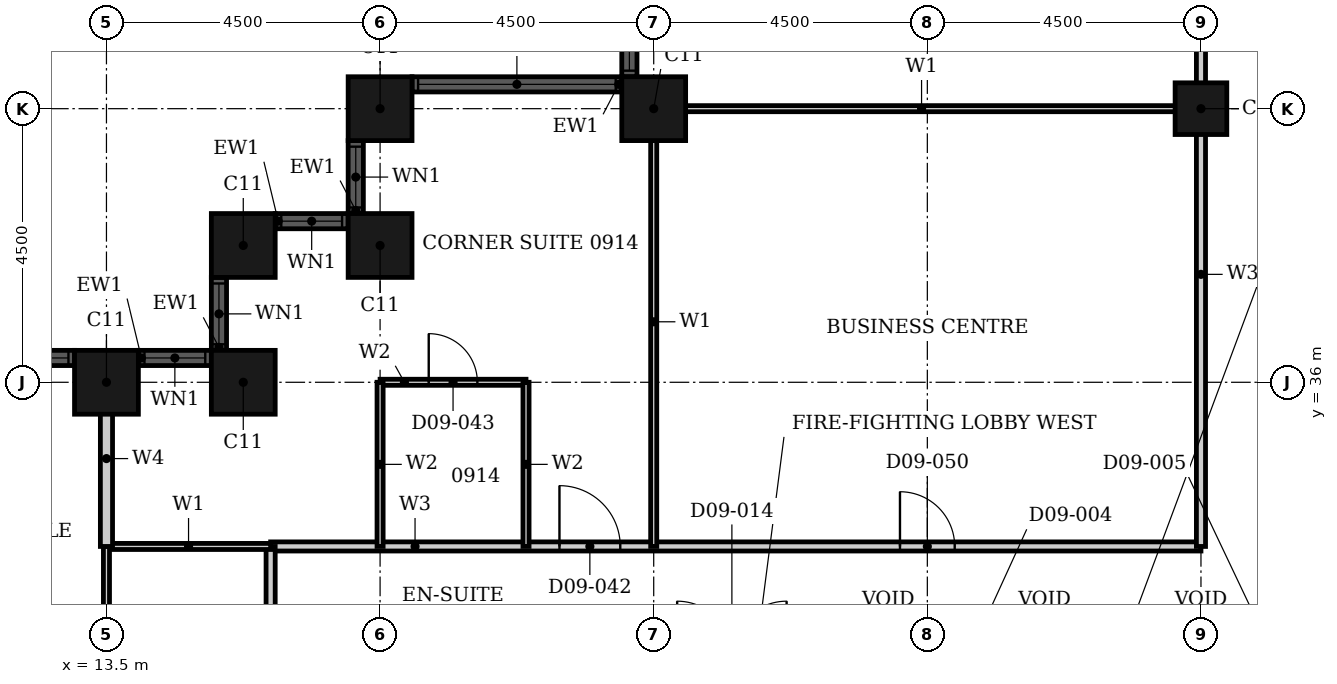
"""IFC4 building model, lengths in metres.
Left out: names, types, materials, properties, quantities, classifications, styles, units other than length and angle.
Written with IfcOpenShell. Run it as: python <this file> out.ifc"""

import sys

from ifc_helpers import new_model, si_unit, direction, frame, frame_2d, origin, origin_2d, place, context, subcontext, project, spatial, rectangle, hollow_rectangle, extrude, element, fill, save


model = new_model("IFC4")
c1 = context("Model", 3, precision=1e-05, world=origin(), true_north=direction((0.0, 1.0)))
c2 = subcontext(c1, "Body", "Model", "MODEL_VIEW")
j1 = project(units=[si_unit("LENGTHUNIT", "METRE"), si_unit("PLANEANGLEUNIT", "RADIAN")], contexts=[c1])
p1 = place(None, origin())
s1 = spatial("IfcSite", under=j1, at=p1, CompositionType="ELEMENT")
p2 = place(p1, origin())
s2 = spatial("IfcBuilding", under=s1, at=p2, CompositionType="ELEMENT")
p3 = place(p2, frame((0.0, 0.0, 44.4)))
s3 = spatial("IfcBuildingStorey", under=s2, at=p3, CompositionType="ELEMENT", Elevation=44.4)
for number, where, z_axis, x_axis in (
    (1, (22.5, 40.5, 0.0), (0.0, 0.0, 1.0), (1.0, 0.0, 0.0)),
    (2, (18.0, 40.5, 0.0), (0.0, 0.0, 1.0), (1.0, 0.0, 0.0)),
    (3, (18.0, 38.25, 0.0), (0.0, 0.0, 1.0), (1.0, 0.0, 0.0)),
    (4, (15.75, 38.25, 0.0), (0.0, 0.0, 1.0), (1.0, 0.0, 0.0)),
    (5, (15.75, 36.0, 0.0), (0.0, 0.0, 1.0), (1.0, 0.0, 0.0)),
    (6, (13.5, 36.0, 0.0), (0.0, 0.0, 1.0), (1.0, 0.0, 0.0)),
):
    element("IfcColumn", number, at=place(p3, frame(where, z_axis=z_axis, x_axis=x_axis)), inside=s3, PredefinedType="COLUMN", context=c2, shape_type="SweptSolid", body=[
        extrude(hollow_rectangle(XDim=1.05, YDim=1.05, WallThickness=0.034, at=origin_2d()), origin(), (0.0, 0.0, 1.0), 3.6),
    ])
p4 = place(p3, frame((31.5, 40.5, 0.0), z_axis=(0.0, 0.0, 1.0), x_axis=(1.0, 0.0, 0.0)))
e7 = element("IfcColumn", 7, at=p4, inside=s3, PredefinedType="COLUMN", context=c2, shape_type="SweptSolid", body=[
    extrude(hollow_rectangle(XDim=0.85, YDim=0.85, WallThickness=0.026, at=origin_2d()), origin(), (0.0, 0.0, 1.0), 3.6),
])
p5 = place(p3, frame((22.1, 48.975, 0.0), z_axis=(0.0, 0.0, 1.0), x_axis=(0.0, -1.0, 0.0)))
e8 = element("IfcWall", 8, at=p5, inside=s3, PredefinedType="SOLIDWALL", context=c2, shape_type="SweptSolid", body=[
    extrude(rectangle(XDim=7.95, YDim=0.25, at=frame_2d((3.975, 0.0))), origin(), (0.0, 0.0, 1.0), 3.6),
])
p6 = place(p5, frame((0.1, 0.0, 0.9)))
e9 = element("IfcOpeningElement", 9, at=p6, cuts=e8, PredefinedType="OPENING", context=c2, shape_type="SweptSolid", body=[
    extrude(rectangle(XDim=3.25, YDim=2.08, at=frame_2d((1.625, 1.04))), frame((0.0, 0.135, 0.0), z_axis=(0.0, -1.0, 0.0), x_axis=(1.0, 0.0, 0.0)), (0.0, 0.0, 1.0), 0.27),
])
p7 = place(p5, frame((4.6, 0.0, 0.9)))
e10 = element("IfcOpeningElement", 10, at=p7, cuts=e8, PredefinedType="OPENING", context=c2, shape_type="SweptSolid", body=[
    extrude(rectangle(XDim=3.25, YDim=2.08, at=frame_2d((1.625, 1.04))), frame((0.0, 0.135, 0.0), z_axis=(0.0, -1.0, 0.0), x_axis=(1.0, 0.0, 0.0)), (0.0, 0.0, 1.0), 0.27),
])
p8 = place(p3, frame((21.975, 40.9, 0.0), z_axis=(0.0, 0.0, 1.0), x_axis=(-1.0, 0.0, 0.0)))
e11 = element("IfcWall", 11, at=p8, inside=s3, PredefinedType="SOLIDWALL", context=c2, shape_type="SweptSolid", body=[
    extrude(rectangle(XDim=3.45, YDim=0.25, at=frame_2d((1.725, 0.0))), origin(), (0.0, 0.0, 1.0), 3.6),
])
p9 = place(p8, frame((0.1, 0.0, 0.9)))
e12 = element("IfcOpeningElement", 12, at=p9, cuts=e11, PredefinedType="OPENING", context=c2, shape_type="SweptSolid", body=[
    extrude(rectangle(XDim=3.25, YDim=2.08, at=frame_2d((1.625, 1.04))), frame((0.0, 0.135, 0.0), z_axis=(0.0, -1.0, 0.0), x_axis=(1.0, 0.0, 0.0)), (0.0, 0.0, 1.0), 0.27),
])
p10 = place(p3, frame((17.6, 39.975, 0.0), z_axis=(0.0, 0.0, 1.0), x_axis=(0.0, -1.0, 0.0)))
e13 = element("IfcWall", 13, at=p10, inside=s3, PredefinedType="SOLIDWALL", context=c2, shape_type="SweptSolid", body=[
    extrude(rectangle(XDim=1.2, YDim=0.25, at=frame_2d((0.6, 0.0))), origin(), (0.0, 0.0, 1.0), 3.6),
])
p11 = place(p10, frame((0.1, 0.0, 0.9)))
e14 = element("IfcOpeningElement", 14, at=p11, cuts=e13, PredefinedType="OPENING", context=c2, shape_type="SweptSolid", body=[
    extrude(rectangle(XDim=1.0, YDim=2.08, at=frame_2d((0.5, 1.04))), frame((0.0, 0.135, 0.0), z_axis=(0.0, -1.0, 0.0), x_axis=(1.0, 0.0, 0.0)), (0.0, 0.0, 1.0), 0.27),
])
p12 = place(p3, frame((17.475, 38.65, 0.0), z_axis=(0.0, 0.0, 1.0), x_axis=(-1.0, 0.0, 0.0)))
e15 = element("IfcWall", 15, at=p12, inside=s3, PredefinedType="SOLIDWALL", context=c2, shape_type="SweptSolid", body=[
    extrude(rectangle(XDim=1.2, YDim=0.25, at=frame_2d((0.6, 0.0))), origin(), (0.0, 0.0, 1.0), 3.6),
])
p13 = place(p12, frame((0.1, 0.0, 0.9)))
e16 = element("IfcOpeningElement", 16, at=p13, cuts=e15, PredefinedType="OPENING", context=c2, shape_type="SweptSolid", body=[
    extrude(rectangle(XDim=1.0, YDim=2.08, at=frame_2d((0.5, 1.04))), frame((0.0, 0.135, 0.0), z_axis=(0.0, -1.0, 0.0), x_axis=(1.0, 0.0, 0.0)), (0.0, 0.0, 1.0), 0.27),
])
p14 = place(p3, frame((15.35, 37.725, 0.0), z_axis=(0.0, 0.0, 1.0), x_axis=(0.0, -1.0, 0.0)))
e17 = element("IfcWall", 17, at=p14, inside=s3, PredefinedType="SOLIDWALL", context=c2, shape_type="SweptSolid", body=[
    extrude(rectangle(XDim=1.2, YDim=0.25, at=frame_2d((0.6, 0.0))), origin(), (0.0, 0.0, 1.0), 3.6),
])
p15 = place(p14, frame((0.1, 0.0, 0.9)))
e18 = element("IfcOpeningElement", 18, at=p15, cuts=e17, PredefinedType="OPENING", context=c2, shape_type="SweptSolid", body=[
    extrude(rectangle(XDim=1.0, YDim=2.08, at=frame_2d((0.5, 1.04))), frame((0.0, 0.135, 0.0), z_axis=(0.0, -1.0, 0.0), x_axis=(1.0, 0.0, 0.0)), (0.0, 0.0, 1.0), 0.27),
])
p16 = place(p3, frame((15.225, 36.4, 0.0), z_axis=(0.0, 0.0, 1.0), x_axis=(-1.0, 0.0, 0.0)))
e19 = element("IfcWall", 19, at=p16, inside=s3, PredefinedType="SOLIDWALL", context=c2, shape_type="SweptSolid", body=[
    extrude(rectangle(XDim=1.2, YDim=0.25, at=frame_2d((0.6, 0.0))), origin(), (0.0, 0.0, 1.0), 3.6),
])
p17 = place(p16, frame((0.1, 0.0, 0.9)))
e20 = element("IfcOpeningElement", 20, at=p17, cuts=e19, PredefinedType="OPENING", context=c2, shape_type="SweptSolid", body=[
    extrude(rectangle(XDim=1.0, YDim=2.08, at=frame_2d((0.5, 1.04))), frame((0.0, 0.135, 0.0), z_axis=(0.0, -1.0, 0.0), x_axis=(1.0, 0.0, 0.0)), (0.0, 0.0, 1.0), 0.27),
])
p18 = place(p3, frame((12.975, 36.4, 0.0), z_axis=(0.0, 0.0, 1.0), x_axis=(-1.0, 0.0, 0.0)))
e21 = element("IfcWall", 21, at=p18, inside=s3, PredefinedType="SOLIDWALL", context=c2, shape_type="SweptSolid", body=[
    extrude(rectangle(XDim=7.95, YDim=0.25, at=frame_2d((3.975, 0.0))), origin(), (0.0, 0.0, 1.0), 3.6),
])
p19 = place(p18, frame((0.1, 0.0, 0.9)))
e22 = element("IfcOpeningElement", 22, at=p19, cuts=e21, PredefinedType="OPENING", context=c2, shape_type="SweptSolid", body=[
    extrude(rectangle(XDim=3.25, YDim=2.08, at=frame_2d((1.625, 1.04))), frame((0.0, 0.135, 0.0), z_axis=(0.0, -1.0, 0.0), x_axis=(1.0, 0.0, 0.0)), (0.0, 0.0, 1.0), 0.27),
])
p20 = place(p18, frame((4.6, 0.0, 0.9)))
e23 = element("IfcOpeningElement", 23, at=p20, cuts=e21, PredefinedType="OPENING", context=c2, shape_type="SweptSolid", body=[
    extrude(rectangle(XDim=3.25, YDim=2.08, at=frame_2d((1.625, 1.04))), frame((0.0, 0.135, 0.0), z_axis=(0.0, -1.0, 0.0), x_axis=(1.0, 0.0, 0.0)), (0.0, 0.0, 1.0), 0.27),
])
p21 = place(p3, frame((16.2, 33.3, 0.0), z_axis=(0.0, 0.0, 1.0), x_axis=(1.0, 0.0, 0.0)))
e24 = element("IfcWall", 24, at=p21, inside=s3, PredefinedType="PARTITIONING", context=c2, shape_type="SweptSolid", body=[
    extrude(rectangle(XDim=15.3, YDim=0.15, at=frame_2d((7.65, 0.0))), origin(), (0.0, 0.0, 1.0), 3.2),
])
p22 = place(p21, frame((4.75, 0.0, 0.0)))
e25 = element("IfcOpeningElement", 25, at=p22, cuts=e24, PredefinedType="OPENING", context=c2, shape_type="SweptSolid", body=[
    extrude(rectangle(XDim=1.0, YDim=2.1, at=frame_2d((0.5, 1.05))), frame((0.0, 0.085, 0.0), z_axis=(0.0, -1.0, 0.0), x_axis=(1.0, 0.0, 0.0)), (0.0, 0.0, 1.0), 0.17),
])
p23 = place(p21, frame((10.35, 0.0, 0.0)))
e26 = element("IfcOpeningElement", 26, at=p23, cuts=e24, PredefinedType="OPENING", context=c2, shape_type="SweptSolid", body=[
    extrude(rectangle(XDim=0.9, YDim=2.1, at=frame_2d((0.45, 1.05))), frame((0.0, 0.085, 0.0), z_axis=(0.0, -1.0, 0.0), x_axis=(1.0, 0.0, 0.0)), (0.0, 0.0, 1.0), 0.17),
])
p24 = place(p3, frame((16.2, 27.0, 0.0), z_axis=(0.0, 0.0, 1.0), x_axis=(0.0, 1.0, 0.0)))
e27 = element("IfcWall", 27, at=p24, inside=s3, PredefinedType="PARTITIONING", context=c2, shape_type="SweptSolid", body=[
    extrude(rectangle(XDim=6.3, YDim=0.15, at=frame_2d((3.15, 0.0))), origin(), (0.0, 0.0, 1.0), 3.2),
])
p25 = place(p24, frame((2.525, 0.0, 0.0)))
e28 = element("IfcOpeningElement", 28, at=p25, cuts=e27, PredefinedType="OPENING", context=c2, shape_type="SweptSolid", body=[
    extrude(rectangle(XDim=0.95, YDim=2.1, at=frame_2d((0.475, 1.05))), frame((0.0, 0.085, 0.0), z_axis=(0.0, -1.0, 0.0), x_axis=(1.0, 0.0, 0.0)), (0.0, 0.0, 1.0), 0.17),
])
p26 = place(p3, frame((31.5, 33.3, 0.0), z_axis=(0.0, 0.0, 1.0), x_axis=(0.0, 1.0, 0.0)))
e29 = element("IfcWall", 29, at=p26, inside=s3, PredefinedType="PARTITIONING", context=c2, shape_type="SweptSolid", body=[
    extrude(rectangle(XDim=16.2, YDim=0.15, at=frame_2d((8.1, 0.0))), origin(), (0.0, 0.0, 1.0), 2.48),
])
p27 = place(p26, frame((8.95, 0.0, 0.0)))
e30 = element("IfcOpeningElement", 30, at=p27, cuts=e29, PredefinedType="OPENING", context=c2, shape_type="SweptSolid", body=[
    extrude(rectangle(XDim=1.0, YDim=2.1, at=frame_2d((0.5, 1.05))), frame((0.0, 0.085, 0.0), z_axis=(0.0, -1.0, 0.0), x_axis=(1.0, 0.0, 0.0)), (0.0, 0.0, 1.0), 0.17),
])
p28 = place(p3, frame((13.5, 33.3, 0.0), z_axis=(0.0, 0.0, 1.0), x_axis=(1.0, 0.0, 0.0)))
e31 = element("IfcWall", 31, at=p28, inside=s3, PredefinedType="PARTITIONING", context=c2, shape_type="SweptSolid", body=[
    extrude(rectangle(XDim=2.7, YDim=0.1, at=frame_2d((1.35, 0.0))), origin(), (0.0, 0.0, 1.0), 3.2),
])
p29 = place(p3, frame((22.31, 40.5, 0.0), z_axis=(0.0, 0.0, 1.0), x_axis=(1.0, 0.0, 0.0)))
e32 = element("IfcWall", 32, at=p29, inside=s3, PredefinedType="PARTITIONING", context=c2, shape_type="SweptSolid", body=[
    extrude(rectangle(XDim=9.19, YDim=0.1, at=frame_2d((4.595, 0.0))), origin(), (0.0, 0.0, 1.0), 2.28),
])
p30 = place(p3, frame((13.5, 27.0, 0.0), z_axis=(0.0, 0.0, 1.0), x_axis=(0.0, 1.0, 0.0)))
e33 = element("IfcWall", 33, at=p30, inside=s3, PredefinedType="PARTITIONING", context=c2, shape_type="SweptSolid", body=[
    extrude(rectangle(XDim=6.3, YDim=0.1, at=frame_2d((3.15, 0.0))), origin(), (0.0, 0.0, 1.0), 2.28),
])
p31 = place(p3, frame((22.5, 33.3, 0.0), z_axis=(0.0, 0.0, 1.0), x_axis=(0.0, 1.0, 0.0)))
e34 = element("IfcWall", 34, at=p31, inside=s3, PredefinedType="PARTITIONING", context=c2, shape_type="SweptSolid", body=[
    extrude(rectangle(XDim=7.39, YDim=0.1, at=frame_2d((3.695, 0.0))), origin(), (0.0, 0.0, 1.0), 3.2),
])
p32 = place(p3, frame((13.5, 33.3, 0.0), z_axis=(0.0, 0.0, 1.0), x_axis=(0.0, 1.0, 0.0)))
e35 = element("IfcWall", 35, at=p32, inside=s3, PredefinedType="PARTITIONING", context=c2, shape_type="SweptSolid", body=[
    extrude(rectangle(XDim=2.89, YDim=0.2, at=frame_2d((1.445, 0.0))), origin(), (0.0, 0.0, 1.0), 2.28),
])
p33 = place(p3, frame((18.0, 36.0, 0.0), z_axis=(0.0, 0.0, 1.0), x_axis=(1.0, 0.0, 0.0)))
e36 = element("IfcWall", 36, at=p33, inside=s3, PredefinedType="PARTITIONING", context=c2, shape_type="SweptSolid", body=[
    extrude(rectangle(XDim=2.4, YDim=0.1, at=frame_2d((1.2, 0.0))), origin(), (0.0, 0.0, 1.0), 3.2),
])
p34 = place(p33, frame((0.8, 0.0, 0.0)))
e37 = element("IfcOpeningElement", 37, at=p34, cuts=e36, PredefinedType="OPENING", context=c2, shape_type="SweptSolid", body=[
    extrude(rectangle(XDim=0.8, YDim=2.1, at=frame_2d((0.4, 1.05))), frame((0.0, 0.06, 0.0), z_axis=(0.0, -1.0, 0.0), x_axis=(1.0, 0.0, 0.0)), (0.0, 0.0, 1.0), 0.12),
])
for number, where, z_axis, x_axis in (
    (38, (18.0, 33.3, 0.0), (0.0, 0.0, 1.0), (0.0, 1.0, 0.0)),
    (39, (20.4, 33.3, 0.0), (0.0, 0.0, 1.0), (0.0, 1.0, 0.0)),
):
    element("IfcWall", number, at=place(p3, frame(where, z_axis=z_axis, x_axis=x_axis)), inside=s3, PredefinedType="PARTITIONING", context=c2, shape_type="SweptSolid", body=[
        extrude(rectangle(XDim=2.7, YDim=0.1, at=frame_2d((1.35, 0.0))), origin(), (0.0, 0.0, 1.0), 3.2),
    ])
p35 = place(p7, origin())
e40 = element("IfcWindow", 40, at=p35, inside=s3, PartitioningType="SINGLE_PANEL", PredefinedType="WINDOW", context=c2, shape_type="SweptSolid", body=[
    extrude(rectangle(XDim=3.25, YDim=2.08, at=frame_2d((1.625, 1.04))), frame((0.0, 0.03, 0.0), z_axis=(0.0, -1.0, 0.0), x_axis=(1.0, 0.0, 0.0)), (0.0, 0.0, 1.0), 0.06),
])
fill(e10, e40)
p36 = place(p9, origin())
e41 = element("IfcWindow", 41, at=p36, inside=s3, PartitioningType="SINGLE_PANEL", PredefinedType="WINDOW", context=c2, shape_type="SweptSolid", body=[
    extrude(rectangle(XDim=3.25, YDim=2.08, at=frame_2d((1.625, 1.04))), frame((0.0, 0.03, 0.0), z_axis=(0.0, -1.0, 0.0), x_axis=(1.0, 0.0, 0.0)), (0.0, 0.0, 1.0), 0.06),
])
fill(e12, e41)
p37 = place(p11, origin())
e42 = element("IfcWindow", 42, at=p37, inside=s3, PartitioningType="SINGLE_PANEL", PredefinedType="WINDOW", context=c2, shape_type="SweptSolid", body=[
    extrude(rectangle(XDim=1.0, YDim=2.08, at=frame_2d((0.5, 1.04))), frame((0.0, 0.03, 0.0), z_axis=(0.0, -1.0, 0.0), x_axis=(1.0, 0.0, 0.0)), (0.0, 0.0, 1.0), 0.06),
])
fill(e14, e42)
p38 = place(p13, origin())
e43 = element("IfcWindow", 43, at=p38, inside=s3, PartitioningType="SINGLE_PANEL", PredefinedType="WINDOW", context=c2, shape_type="SweptSolid", body=[
    extrude(rectangle(XDim=1.0, YDim=2.08, at=frame_2d((0.5, 1.04))), frame((0.0, 0.03, 0.0), z_axis=(0.0, -1.0, 0.0), x_axis=(1.0, 0.0, 0.0)), (0.0, 0.0, 1.0), 0.06),
])
fill(e16, e43)
p39 = place(p15, origin())
e44 = element("IfcWindow", 44, at=p39, inside=s3, PartitioningType="SINGLE_PANEL", PredefinedType="WINDOW", context=c2, shape_type="SweptSolid", body=[
    extrude(rectangle(XDim=1.0, YDim=2.08, at=frame_2d((0.5, 1.04))), frame((0.0, 0.03, 0.0), z_axis=(0.0, -1.0, 0.0), x_axis=(1.0, 0.0, 0.0)), (0.0, 0.0, 1.0), 0.06),
])
fill(e18, e44)
p40 = place(p17, origin())
e45 = element("IfcWindow", 45, at=p40, inside=s3, PartitioningType="SINGLE_PANEL", PredefinedType="WINDOW", context=c2, shape_type="SweptSolid", body=[
    extrude(rectangle(XDim=1.0, YDim=2.08, at=frame_2d((0.5, 1.04))), frame((0.0, 0.03, 0.0), z_axis=(0.0, -1.0, 0.0), x_axis=(1.0, 0.0, 0.0)), (0.0, 0.0, 1.0), 0.06),
])
fill(e20, e45)
p41 = place(p19, origin())
e46 = element("IfcWindow", 46, at=p41, inside=s3, PartitioningType="SINGLE_PANEL", PredefinedType="WINDOW", context=c2, shape_type="SweptSolid", body=[
    extrude(rectangle(XDim=3.25, YDim=2.08, at=frame_2d((1.625, 1.04))), frame((0.0, 0.03, 0.0), z_axis=(0.0, -1.0, 0.0), x_axis=(1.0, 0.0, 0.0)), (0.0, 0.0, 1.0), 0.06),
])
fill(e22, e46)
p42 = place(p22, origin())
e47 = element("IfcDoor", 47, at=p42, inside=s3, OperationType="SINGLE_SWING_RIGHT", PredefinedType="DOOR", context=c2, shape_type="SweptSolid", body=[
    extrude(rectangle(XDim=1.0, YDim=2.1, at=frame_2d((0.5, 1.05))), frame((0.0, 0.025, 0.0), z_axis=(0.0, -1.0, 0.0), x_axis=(1.0, 0.0, 0.0)), (0.0, 0.0, 1.0), 0.05),
])
fill(e25, e47)
p43 = place(p34, origin())
e48 = element("IfcDoor", 48, at=p43, inside=s3, OperationType="SINGLE_SWING_LEFT", PredefinedType="DOOR", context=c2, shape_type="SweptSolid", body=[
    extrude(rectangle(XDim=0.8, YDim=2.1, at=frame_2d((0.4, 1.05))), frame((0.0, 0.025, 0.0), z_axis=(0.0, -1.0, 0.0), x_axis=(1.0, 0.0, 0.0)), (0.0, 0.0, 1.0), 0.05),
])
fill(e37, e48)
p44 = place(p23, origin())
e49 = element("IfcDoor", 49, at=p44, inside=s3, OperationType="SINGLE_SWING_LEFT", PredefinedType="DOOR", context=c2, shape_type="SweptSolid", body=[
    extrude(rectangle(XDim=0.9, YDim=2.1, at=frame_2d((0.45, 1.05))), frame((0.0, 0.025, 0.0), z_axis=(0.0, -1.0, 0.0), x_axis=(1.0, 0.0, 0.0)), (0.0, 0.0, 1.0), 0.05),
])
fill(e26, e49)
save(model, sys.argv[1])
